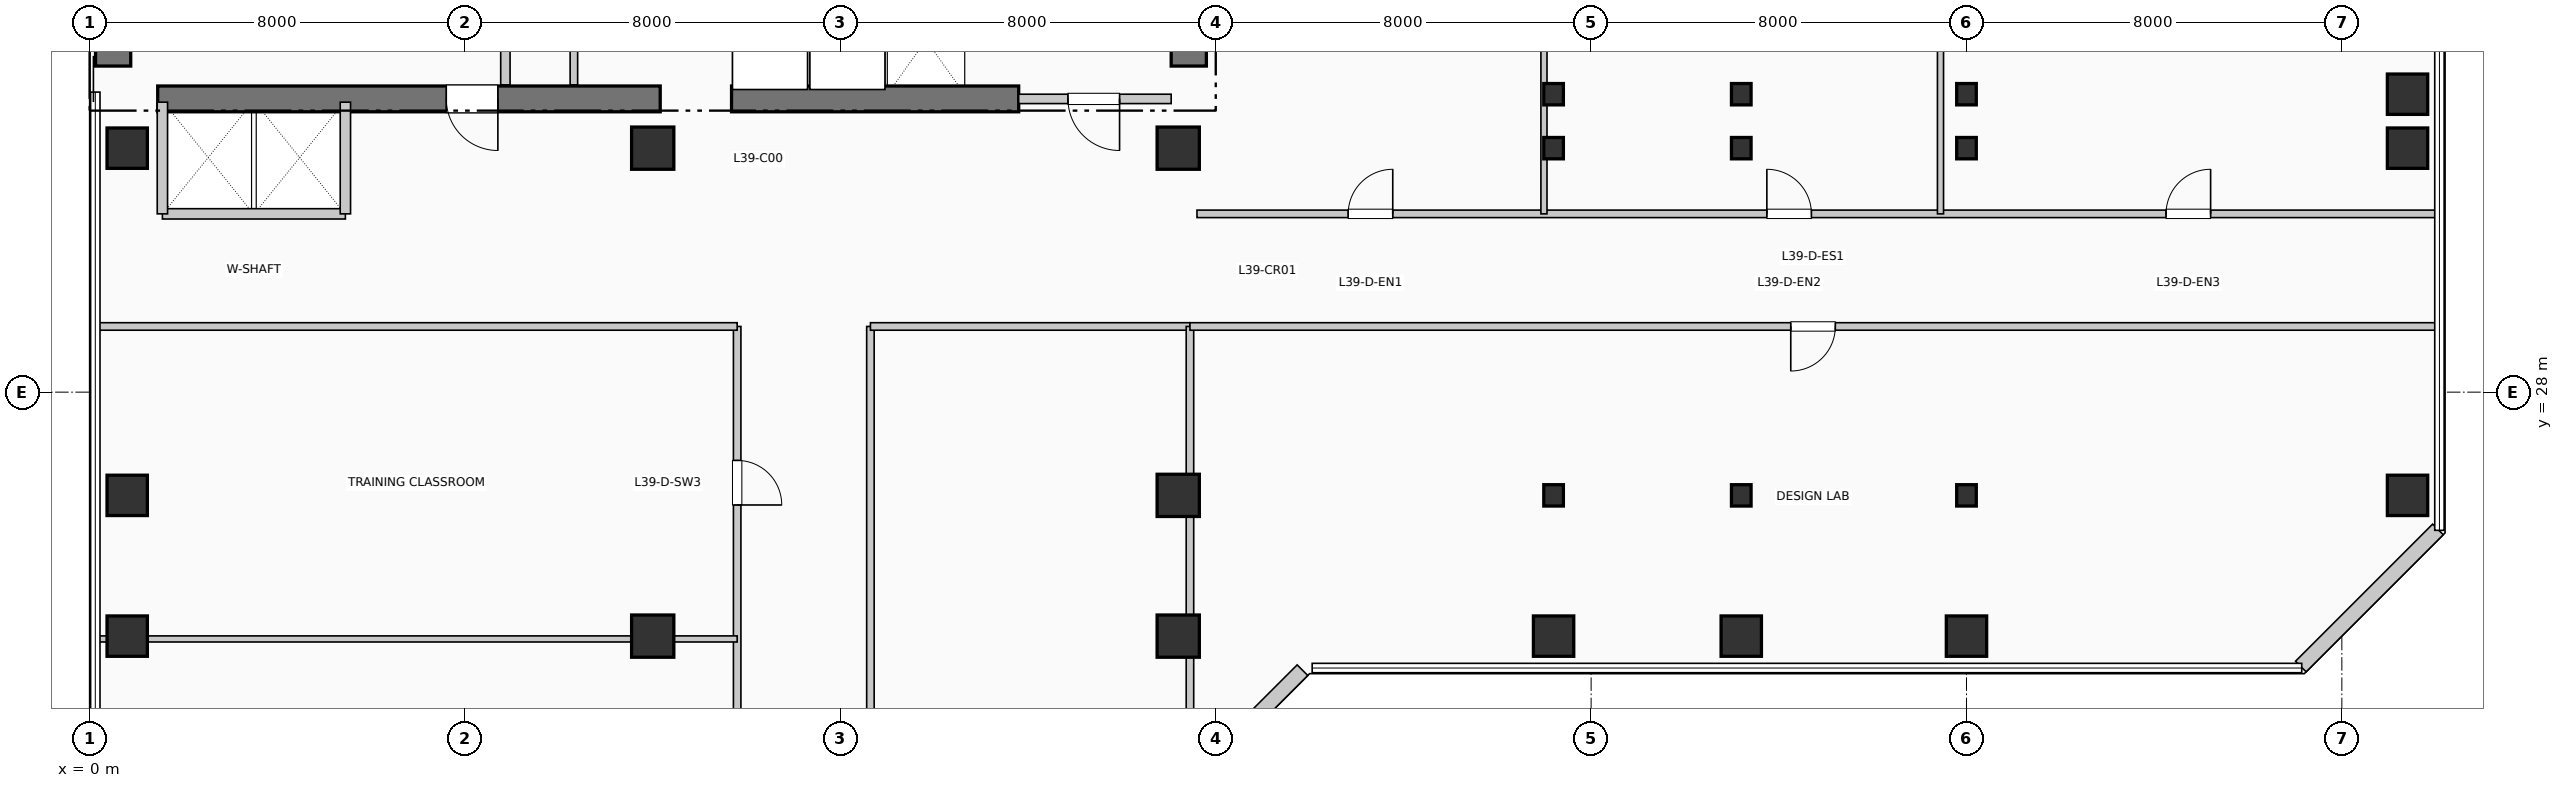
"""IFC4 building model, lengths in metres.
Left out: names, types, materials, properties, quantities, classifications, styles, units other than length and angle.
Written with IfcOpenShell. Run it as: python <this file> out.ifc"""

import sys

from ifc_helpers import new_model, si_unit, direction, frame, frame_2d, origin, origin_2d, place, context, subcontext, project, spatial, rectangle, i_section, extrude, element, fill, save


model = new_model("IFC4")
c1 = context("Model", 3, precision=1e-05, world=origin(), true_north=direction((0.0, 1.0)))
c2 = subcontext(c1, "Body", "Model", "MODEL_VIEW")
j1 = project(units=[si_unit("LENGTHUNIT", "METRE"), si_unit("PLANEANGLEUNIT", "RADIAN")], contexts=[c1])
p1 = place(None, origin())
s1 = spatial("IfcSite", under=j1, at=p1, CompositionType="ELEMENT")
p2 = place(p1, origin())
s2 = spatial("IfcBuilding", under=s1, at=p2, CompositionType="ELEMENT")
p3 = place(p2, frame((0.0, 0.0, 162.69)))
s3 = spatial("IfcBuildingStorey", under=s2, at=p3, CompositionType="ELEMENT", Elevation=162.69)
p4 = place(p3, frame((0.5, 34.95, 0.0), z_axis=(0.0, 0.0, 1.0), x_axis=(0.0, 1.0, 0.0)))
e1 = element("IfcWall", 1, at=p4, inside=s3, PredefinedType="SHEAR", context=c2, shape_type="SweptSolid", body=[
    extrude(rectangle(XDim=7.9, YDim=0.75, at=frame_2d((3.95, 0.0))), origin(), (0.0, 0.0, 1.0), 3.96),
])
p5 = place(p3, frame((23.425, 34.95, 0.0), z_axis=(0.0, 0.0, 1.0), x_axis=(0.0, 1.0, 0.0)))
e2 = element("IfcWall", 2, at=p5, inside=s3, PredefinedType="SHEAR", context=c2, shape_type="SweptSolid", body=[
    extrude(rectangle(XDim=10.64, YDim=0.75, at=frame_2d((5.32, 0.0))), origin(), (0.0, 0.0, 1.0), 3.96),
])
p6 = place(p3, frame((1.45, 34.25, 0.0), z_axis=(0.0, 0.0, 1.0), x_axis=(1.0, 0.0, 0.0)))
e3 = element("IfcWall", 3, at=p6, inside=s3, PredefinedType="SHEAR", context=c2, shape_type="SweptSolid", body=[
    extrude(rectangle(XDim=10.71, YDim=0.55, at=frame_2d((5.355, 0.0))), origin(), (0.0, 0.0, 1.0), 3.96),
])
p7 = place(p6, frame((7.25, 0.0, 0.0), z_axis=(0.0, 0.0, 1.0), x_axis=(-1.0, 0.0, 0.0)))
e4 = element("IfcOpeningElement", 4, at=p7, cuts=e3, PredefinedType="OPENING", context=c2, shape_type="SweptSolid", body=[
    extrude(rectangle(XDim=1.1, YDim=2.15, at=frame_2d((0.55, 1.075))), frame((0.0, 0.285, 0.0), z_axis=(0.0, -1.0, 0.0), x_axis=(1.0, 0.0, 0.0)), (0.0, 0.0, 1.0), 0.57),
])
p8 = place(p3, frame((13.68, 34.25, 0.0), z_axis=(0.0, 0.0, 1.0), x_axis=(1.0, 0.0, 0.0)))
e5 = element("IfcWall", 5, at=p8, inside=s3, PredefinedType="SHEAR", context=c2, shape_type="SweptSolid", body=[
    extrude(rectangle(XDim=6.12, YDim=0.55, at=frame_2d((3.06, 0.0))), origin(), (0.0, 0.0, 1.0), 3.96),
])
for number, where, z_axis, x_axis in (
    (6, (0.8, 22.8, 0.0), (0.0, 0.0, 1.0), (1.0, 0.0, 0.0)),
    (7, (0.8, 25.8, 0.0), (0.0, 0.0, 1.0), (1.0, 0.0, 0.0)),
    (8, (0.8, 33.2, 0.0), (0.0, 0.0, 1.0), (1.0, 0.0, 0.0)),
):
    element("IfcColumn", number, at=place(p3, frame(where, z_axis=z_axis, x_axis=x_axis)), inside=s3, PredefinedType="COLUMN", context=c2, shape_type="SweptSolid", body=[
        extrude(rectangle(XDim=0.86, YDim=0.86, at=origin_2d()), origin(), (0.0, 0.0, 1.0), 3.96),
    ])
for number, where, z_axis, x_axis in (
    (9, (12.0, 22.8, 0.0), (0.0, 0.0, 1.0), (1.0, 0.0, 0.0)),
    (10, (12.0, 33.2, 0.0), (0.0, 0.0, 1.0), (1.0, 0.0, 0.0)),
    (11, (23.2, 22.8, 0.0), (0.0, 0.0, 1.0), (1.0, 0.0, 0.0)),
    (12, (23.2, 25.8, 0.0), (0.0, 0.0, 1.0), (1.0, 0.0, 0.0)),
    (13, (23.2, 33.2, 0.0), (0.0, 0.0, 1.0), (1.0, 0.0, 0.0)),
):
    element("IfcColumn", number, at=place(p3, frame(where, z_axis=z_axis, x_axis=x_axis)), inside=s3, PredefinedType="COLUMN", context=c2, shape_type="SweptSolid", body=[
        extrude(rectangle(XDim=0.9, YDim=0.9, at=origin_2d()), origin(), (0.0, 0.0, 1.0), 3.96),
    ])
p9 = place(p3, frame((31.2, 22.8, 0.0), z_axis=(0.0, 0.0, 1.0), x_axis=(1.0, 0.0, 0.0)))
e14 = element("IfcColumn", 14, at=p9, inside=s3, PredefinedType="COLUMN", context=c2, shape_type="SweptSolid", body=[
    extrude(rectangle(XDim=0.86, YDim=0.86, at=origin_2d()), origin(), (0.0, 0.0, 1.0), 3.96),
])
for number, where, z_axis, x_axis in (
    (15, (31.2, 25.8, 0.0), (0.0, 0.0, 1.0), (1.0, 0.0, 0.0)),
    (16, (31.2, 33.2, 0.0), (0.0, 0.0, 1.0), (1.0, 0.0, 0.0)),
    (17, (31.2, 34.35, 0.0), (0.0, 0.0, 1.0), (1.0, 0.0, 0.0)),
):
    element("IfcColumn", number, at=place(p3, frame(where, z_axis=z_axis, x_axis=x_axis)), inside=s3, PredefinedType="COLUMN", context=c2, shape_type="SweptSolid", body=[
        extrude(i_section(OverallWidth=0.418, OverallDepth=0.455, WebThickness=0.032, FlangeThickness=0.051, at=origin_2d()), origin(), (0.0, 0.0, 1.0), 3.96),
    ])
p10 = place(p3, frame((35.2, 22.8, 0.0), z_axis=(0.0, 0.0, 1.0), x_axis=(1.0, 0.0, 0.0)))
e18 = element("IfcColumn", 18, at=p10, inside=s3, PredefinedType="COLUMN", context=c2, shape_type="SweptSolid", body=[
    extrude(rectangle(XDim=0.86, YDim=0.86, at=origin_2d()), origin(), (0.0, 0.0, 1.0), 3.96),
])
for number, where, z_axis, x_axis in (
    (19, (35.2, 25.8, 0.0), (0.0, 0.0, 1.0), (1.0, 0.0, 0.0)),
    (20, (35.2, 33.2, 0.0), (0.0, 0.0, 1.0), (1.0, 0.0, 0.0)),
    (21, (35.2, 34.35, 0.0), (0.0, 0.0, 1.0), (1.0, 0.0, 0.0)),
):
    element("IfcColumn", number, at=place(p3, frame(where, z_axis=z_axis, x_axis=x_axis)), inside=s3, PredefinedType="COLUMN", context=c2, shape_type="SweptSolid", body=[
        extrude(i_section(OverallWidth=0.418, OverallDepth=0.455, WebThickness=0.032, FlangeThickness=0.051, at=origin_2d()), origin(), (0.0, 0.0, 1.0), 3.96),
    ])
p11 = place(p3, frame((40.0, 22.8, 0.0), z_axis=(0.0, 0.0, 1.0), x_axis=(1.0, 0.0, 0.0)))
e22 = element("IfcColumn", 22, at=p11, inside=s3, PredefinedType="COLUMN", context=c2, shape_type="SweptSolid", body=[
    extrude(rectangle(XDim=0.86, YDim=0.86, at=origin_2d()), origin(), (0.0, 0.0, 1.0), 3.96),
])
for number, where, z_axis, x_axis in (
    (23, (40.0, 25.8, 0.0), (0.0, 0.0, 1.0), (1.0, 0.0, 0.0)),
    (24, (40.0, 33.2, 0.0), (0.0, 0.0, 1.0), (1.0, 0.0, 0.0)),
    (25, (40.0, 34.35, 0.0), (0.0, 0.0, 1.0), (1.0, 0.0, 0.0)),
):
    element("IfcColumn", number, at=place(p3, frame(where, z_axis=z_axis, x_axis=x_axis)), inside=s3, PredefinedType="COLUMN", context=c2, shape_type="SweptSolid", body=[
        extrude(i_section(OverallWidth=0.418, OverallDepth=0.455, WebThickness=0.032, FlangeThickness=0.051, at=origin_2d()), origin(), (0.0, 0.0, 1.0), 3.96),
    ])
for number, where, z_axis, x_axis in (
    (26, (49.4, 25.8, 0.0), (0.0, 0.0, 1.0), (1.0, 0.0, 0.0)),
    (27, (49.4, 33.2, 0.0), (0.0, 0.0, 1.0), (1.0, 0.0, 0.0)),
    (28, (49.4, 34.35, 0.0), (0.0, 0.0, 1.0), (1.0, 0.0, 0.0)),
):
    element("IfcColumn", number, at=place(p3, frame(where, z_axis=z_axis, x_axis=x_axis)), inside=s3, PredefinedType="COLUMN", context=c2, shape_type="SweptSolid", body=[
        extrude(rectangle(XDim=0.86, YDim=0.86, at=origin_2d()), origin(), (0.0, 0.0, 1.0), 3.96),
    ])
p12 = place(p3, frame((23.926, 20.152, 0.0), z_axis=(0.0, 0.0, 1.0), x_axis=(0.707106781187, 0.707106781187, 0.0)))
e29 = element("IfcWall", 29, at=p12, inside=s3, PredefinedType="SOLIDWALL", context=c2, shape_type="SweptSolid", body=[
    extrude(rectangle(XDim=2.718, YDim=0.32, at=frame_2d((1.359, 0.0))), origin(), (0.0, 0.0, 1.0), 3.71),
])
p13 = place(p3, frame((47.126, 22.152, 0.0), z_axis=(0.0, 0.0, 1.0), x_axis=(0.707136318428, 0.707077242712, 0.0)))
e30 = element("IfcWall", 30, at=p13, inside=s3, PredefinedType="SOLIDWALL", context=c2, shape_type="SweptSolid", body=[
    extrude(rectangle(XDim=4.133, YDim=0.32, at=frame_2d((2.066, 0.0))), origin(), (0.0, 0.0, 1.0), 3.71),
])
p14 = place(p3, frame((8.86, 34.55, 0.0), z_axis=(0.0, 0.0, 1.0), x_axis=(0.0, 1.0, 0.0)))
e31 = element("IfcWall", 31, at=p14, inside=s3, PredefinedType="PARTITIONING", context=c2, shape_type="SweptSolid", body=[
    extrude(rectangle(XDim=2.5, YDim=0.2, at=frame_2d((1.25, 0.0))), origin(), (0.0, 0.0, 1.0), 3.71),
])
p15 = place(p3, frame((19.8, 34.25, 0.0), z_axis=(0.0, 0.0, 1.0), x_axis=(1.0, 0.0, 0.0)))
e32 = element("IfcWall", 32, at=p15, inside=s3, PredefinedType="PARTITIONING", context=c2, shape_type="SweptSolid", body=[
    extrude(rectangle(XDim=3.25, YDim=0.2, at=frame_2d((1.625, 0.0))), origin(), (0.0, 0.0, 1.0), 3.71),
])
p16 = place(p15, frame((2.15, 0.0, 0.0), z_axis=(0.0, 0.0, 1.0), x_axis=(-1.0, 0.0, 0.0)))
e33 = element("IfcOpeningElement", 33, at=p16, cuts=e32, PredefinedType="OPENING", context=c2, shape_type="SweptSolid", body=[
    extrude(rectangle(XDim=1.1, YDim=2.15, at=frame_2d((0.55, 1.075))), frame((0.0, 0.11, 0.0), z_axis=(0.0, -1.0, 0.0), x_axis=(1.0, 0.0, 0.0)), (0.0, 0.0, 1.0), 0.22),
])
p17 = place(p3, frame((1.55, 31.8, 0.0), z_axis=(0.0, 0.0, 1.0), x_axis=(1.0, 0.0, 0.0)))
e34 = element("IfcWall", 34, at=p17, inside=s3, PredefinedType="PARTITIONING", context=c2, shape_type="SweptSolid", body=[
    extrude(rectangle(XDim=3.9, YDim=0.22, at=frame_2d((1.95, 0.0))), origin(), (0.0, 0.0, 1.0), 3.71),
])
for number, where, z_axis, x_axis in (
    (35, (1.55, 31.8, 0.0), (0.0, 0.0, 1.0), (0.0, 1.0, 0.0)),
    (36, (5.45, 31.8, 0.0), (0.0, 0.0, 1.0), (0.0, 1.0, 0.0)),
):
    element("IfcWall", number, at=place(p3, frame(where, z_axis=z_axis, x_axis=x_axis)), inside=s3, PredefinedType="PARTITIONING", context=c2, shape_type="SweptSolid", body=[
        extrude(rectangle(XDim=2.38, YDim=0.22, at=frame_2d((1.19, 0.0))), origin(), (0.0, 0.0, 1.0), 3.71),
    ])
p18 = place(p3, frame((10.32, 34.55, 0.0), z_axis=(0.0, 0.0, 1.0), x_axis=(0.0, 1.0, 0.0)))
e37 = element("IfcWall", 37, at=p18, inside=s3, PredefinedType="PARTITIONING", context=c2, shape_type="SweptSolid", body=[
    extrude(rectangle(XDim=2.15, YDim=0.16, at=frame_2d((1.075, 0.0))), origin(), (0.0, 0.0, 1.0), 3.71),
])
p19 = place(p3, frame((13.8, 7.2, 0.0), z_axis=(0.0, 0.0, 1.0), x_axis=(0.0, 1.0, 0.0)))
e38 = element("IfcWall", 38, at=p19, inside=s3, PredefinedType="PARTITIONING", context=c2, shape_type="SweptSolid", body=[
    extrude(rectangle(XDim=22.2, YDim=0.16, at=frame_2d((11.1, 0.0))), origin(), (0.0, 0.0, 1.0), 3.71),
])
p20 = place(p19, frame((4.36, 0.0, 0.0), z_axis=(0.0, 0.0, 1.0), x_axis=(-1.0, 0.0, 0.0)))
e39 = element("IfcOpeningElement", 39, at=p20, cuts=e38, PredefinedType="OPENING", context=c2, shape_type="SweptSolid", body=[
    extrude(rectangle(XDim=0.95, YDim=2.15, at=frame_2d((0.475, 1.075))), frame((0.0, 0.09, 0.0), z_axis=(0.0, -1.0, 0.0), x_axis=(1.0, 0.0, 0.0)), (0.0, 0.0, 1.0), 0.18),
])
p21 = place(p19, frame((12.13, 0.0, 0.0), z_axis=(0.0, 0.0, 1.0), x_axis=(-1.0, 0.0, 0.0)))
e40 = element("IfcOpeningElement", 40, at=p21, cuts=e38, PredefinedType="OPENING", context=c2, shape_type="SweptSolid", body=[
    extrude(rectangle(XDim=0.95, YDim=2.15, at=frame_2d((0.475, 1.075))), frame((0.0, 0.09, 0.0), z_axis=(0.0, -1.0, 0.0), x_axis=(1.0, 0.0, 0.0)), (0.0, 0.0, 1.0), 0.18),
])
p22 = place(p19, frame((19.345, 0.0, 0.0), z_axis=(0.0, 0.0, 1.0), x_axis=(-1.0, 0.0, 0.0)))
e41 = element("IfcOpeningElement", 41, at=p22, cuts=e38, PredefinedType="OPENING", context=c2, shape_type="SweptSolid", body=[
    extrude(rectangle(XDim=0.95, YDim=2.15, at=frame_2d((0.475, 1.075))), frame((0.0, 0.09, 0.0), z_axis=(0.0, -1.0, 0.0), x_axis=(1.0, 0.0, 0.0)), (0.0, 0.0, 1.0), 0.18),
])
p23 = place(p3, frame((16.64, 7.2, 0.0), z_axis=(0.0, 0.0, 1.0), x_axis=(0.0, 1.0, 0.0)))
e42 = element("IfcWall", 42, at=p23, inside=s3, PredefinedType="PARTITIONING", context=c2, shape_type="SweptSolid", body=[
    extrude(rectangle(XDim=22.2, YDim=0.16, at=frame_2d((11.1, 0.0))), origin(), (0.0, 0.0, 1.0), 3.71),
])
p24 = place(p23, frame((10.625, 0.0, 0.0)))
e43 = element("IfcOpeningElement", 43, at=p24, cuts=e42, PredefinedType="OPENING", context=c2, shape_type="SweptSolid", body=[
    extrude(rectangle(XDim=0.95, YDim=2.15, at=frame_2d((0.475, 1.075))), frame((0.0, 0.09, 0.0), z_axis=(0.0, -1.0, 0.0), x_axis=(1.0, 0.0, 0.0)), (0.0, 0.0, 1.0), 0.18),
])
p25 = place(p3, frame((0.19, 29.4, 0.0), z_axis=(0.0, 0.0, 1.0), x_axis=(1.0, 0.0, 0.0)))
e44 = element("IfcWall", 44, at=p25, inside=s3, PredefinedType="PARTITIONING", context=c2, shape_type="SweptSolid", body=[
    extrude(rectangle(XDim=13.61, YDim=0.16, at=frame_2d((6.805, 0.0))), origin(), (0.0, 0.0, 1.0), 3.365),
])
p26 = place(p3, frame((16.64, 29.4, 0.0), z_axis=(0.0, 0.0, 1.0), x_axis=(1.0, 0.0, 0.0)))
e45 = element("IfcWall", 45, at=p26, inside=s3, PredefinedType="PARTITIONING", context=c2, shape_type="SweptSolid", body=[
    extrude(rectangle(XDim=6.81, YDim=0.16, at=frame_2d((3.405, 0.0))), origin(), (0.0, 0.0, 1.0), 3.71),
])
p27 = place(p3, frame((23.45, 1.04, 0.0), z_axis=(0.0, 0.0, 1.0), x_axis=(0.0, 1.0, 0.0)))
e46 = element("IfcWall", 46, at=p27, inside=s3, PredefinedType="PARTITIONING", context=c2, shape_type="SweptSolid", body=[
    extrude(rectangle(XDim=28.36, YDim=0.16, at=frame_2d((14.18, 0.0))), origin(), (0.0, 0.0, 1.0), 3.045),
])
p28 = place(p3, frame((0.19, 22.74, 0.0), z_axis=(0.0, 0.0, 1.0), x_axis=(1.0, 0.0, 0.0)))
e47 = element("IfcWall", 47, at=p28, inside=s3, PredefinedType="PARTITIONING", context=c2, shape_type="SweptSolid", body=[
    extrude(rectangle(XDim=13.61, YDim=0.13, at=frame_2d((6.805, 0.0))), origin(), (0.0, 0.0, 1.0), 3.045),
])
p29 = place(p3, frame((23.45, 29.4, 0.0), z_axis=(0.0, 0.0, 1.0), x_axis=(1.0, 0.0, 0.0)))
e48 = element("IfcWall", 48, at=p29, inside=s3, PredefinedType="PARTITIONING", context=c2, shape_type="SweptSolid", body=[
    extrude(rectangle(XDim=26.56, YDim=0.16, at=frame_2d((13.28, 0.0))), origin(), (0.0, 0.0, 1.0), 3.365),
])
p30 = place(p29, frame((13.755, 0.0, 0.0), z_axis=(0.0, 0.0, 1.0), x_axis=(-1.0, 0.0, 0.0)))
e49 = element("IfcOpeningElement", 49, at=p30, cuts=e48, PredefinedType="OPENING", context=c2, shape_type="SweptSolid", body=[
    extrude(rectangle(XDim=0.95, YDim=2.15, at=frame_2d((0.475, 1.075))), frame((0.0, 0.09, 0.0), z_axis=(0.0, -1.0, 0.0), x_axis=(1.0, 0.0, 0.0)), (0.0, 0.0, 1.0), 0.18),
])
p31 = place(p3, frame((23.6, 31.8, 0.0), z_axis=(0.0, 0.0, 1.0), x_axis=(1.0, 0.0, 0.0)))
e50 = element("IfcWall", 50, at=p31, inside=s3, PredefinedType="PARTITIONING", context=c2, shape_type="SweptSolid", body=[
    extrude(rectangle(XDim=26.41, YDim=0.16, at=frame_2d((13.205, 0.0))), origin(), (0.0, 0.0, 1.0), 3.71),
])
p32 = place(p31, frame((3.222, 0.0, 0.0)))
e51 = element("IfcOpeningElement", 51, at=p32, cuts=e50, PredefinedType="OPENING", context=c2, shape_type="SweptSolid", body=[
    extrude(rectangle(XDim=0.95, YDim=2.15, at=frame_2d((0.475, 1.075))), frame((0.0, 0.09, 0.0), z_axis=(0.0, -1.0, 0.0), x_axis=(1.0, 0.0, 0.0)), (0.0, 0.0, 1.0), 0.18),
])
p33 = place(p31, frame((12.146, 0.0, 0.0)))
e52 = element("IfcOpeningElement", 52, at=p33, cuts=e50, PredefinedType="OPENING", context=c2, shape_type="SweptSolid", body=[
    extrude(rectangle(XDim=0.95, YDim=2.15, at=frame_2d((0.475, 1.075))), frame((0.0, 0.09, 0.0), z_axis=(0.0, -1.0, 0.0), x_axis=(1.0, 0.0, 0.0)), (0.0, 0.0, 1.0), 0.18),
])
p34 = place(p31, frame((20.653, 0.0, 0.0)))
e53 = element("IfcOpeningElement", 53, at=p34, cuts=e50, PredefinedType="OPENING", context=c2, shape_type="SweptSolid", body=[
    extrude(rectangle(XDim=0.95, YDim=2.15, at=frame_2d((0.475, 1.075))), frame((0.0, 0.09, 0.0), z_axis=(0.0, -1.0, 0.0), x_axis=(1.0, 0.0, 0.0)), (0.0, 0.0, 1.0), 0.18),
])
p35 = place(p3, frame((30.995, 31.8, 0.0), z_axis=(0.0, 0.0, 1.0), x_axis=(0.0, 1.0, 0.0)))
e54 = element("IfcWall", 54, at=p35, inside=s3, PredefinedType="PARTITIONING", context=c2, shape_type="SweptSolid", body=[
    extrude(rectangle(XDim=14.01, YDim=0.13, at=frame_2d((7.005, 0.0))), origin(), (0.0, 0.0, 1.0), 3.045),
])
p36 = place(p3, frame((39.446, 31.8, 0.0), z_axis=(0.0, 0.0, 1.0), x_axis=(0.0, 1.0, 0.0)))
e55 = element("IfcWall", 55, at=p36, inside=s3, PredefinedType="PARTITIONING", context=c2, shape_type="SweptSolid", body=[
    extrude(rectangle(XDim=14.01, YDim=0.13, at=frame_2d((7.005, 0.0))), origin(), (0.0, 0.0, 1.0), 3.71),
])
p37 = place(p7, origin())
e56 = element("IfcDoor", 56, at=p37, inside=s3, OperationType="SINGLE_SWING_RIGHT", PredefinedType="DOOR", context=c2, shape_type="SweptSolid", body=[
    extrude(rectangle(XDim=1.1, YDim=2.15, at=frame_2d((0.55, 1.075))), frame((0.0, 0.025, 0.0), z_axis=(0.0, -1.0, 0.0), x_axis=(1.0, 0.0, 0.0)), (0.0, 0.0, 1.0), 0.05),
])
fill(e4, e56)
p38 = place(p16, origin())
e57 = element("IfcDoor", 57, at=p38, inside=s3, OperationType="SINGLE_SWING_RIGHT", PredefinedType="DOOR", context=c2, shape_type="SweptSolid", body=[
    extrude(rectangle(XDim=1.1, YDim=2.15, at=frame_2d((0.55, 1.075))), frame((0.0, 0.025, 0.0), z_axis=(0.0, -1.0, 0.0), x_axis=(1.0, 0.0, 0.0)), (0.0, 0.0, 1.0), 0.05),
])
fill(e33, e57)
p39 = place(p22, origin())
e58 = element("IfcDoor", 58, at=p39, inside=s3, OperationType="SINGLE_SWING_LEFT", PredefinedType="DOOR", context=c2, shape_type="SweptSolid", body=[
    extrude(rectangle(XDim=0.95, YDim=2.15, at=frame_2d((0.475, 1.075))), frame((0.0, 0.025, 0.0), z_axis=(0.0, -1.0, 0.0), x_axis=(1.0, 0.0, 0.0)), (0.0, 0.0, 1.0), 0.05),
])
fill(e41, e58)
p40 = place(p30, origin())
e59 = element("IfcDoor", 59, at=p40, inside=s3, OperationType="SINGLE_SWING_LEFT", PredefinedType="DOOR", context=c2, shape_type="SweptSolid", body=[
    extrude(rectangle(XDim=0.95, YDim=2.15, at=frame_2d((0.475, 1.075))), frame((0.0, 0.025, 0.0), z_axis=(0.0, -1.0, 0.0), x_axis=(1.0, 0.0, 0.0)), (0.0, 0.0, 1.0), 0.05),
])
fill(e49, e59)
p41 = place(p32, origin())
e60 = element("IfcDoor", 60, at=p41, inside=s3, OperationType="SINGLE_SWING_RIGHT", PredefinedType="DOOR", context=c2, shape_type="SweptSolid", body=[
    extrude(rectangle(XDim=0.95, YDim=2.15, at=frame_2d((0.475, 1.075))), frame((0.0, 0.025, 0.0), z_axis=(0.0, -1.0, 0.0), x_axis=(1.0, 0.0, 0.0)), (0.0, 0.0, 1.0), 0.05),
])
fill(e51, e60)
p42 = place(p33, origin())
e61 = element("IfcDoor", 61, at=p42, inside=s3, OperationType="SINGLE_SWING_LEFT", PredefinedType="DOOR", context=c2, shape_type="SweptSolid", body=[
    extrude(rectangle(XDim=0.95, YDim=2.15, at=frame_2d((0.475, 1.075))), frame((0.0, 0.025, 0.0), z_axis=(0.0, -1.0, 0.0), x_axis=(1.0, 0.0, 0.0)), (0.0, 0.0, 1.0), 0.05),
])
fill(e52, e61)
p43 = place(p34, origin())
e62 = element("IfcDoor", 62, at=p43, inside=s3, OperationType="SINGLE_SWING_RIGHT", PredefinedType="DOOR", context=c2, shape_type="SweptSolid", body=[
    extrude(rectangle(XDim=0.95, YDim=2.15, at=frame_2d((0.475, 1.075))), frame((0.0, 0.025, 0.0), z_axis=(0.0, -1.0, 0.0), x_axis=(1.0, 0.0, 0.0)), (0.0, 0.0, 1.0), 0.05),
])
fill(e53, e62)
save(model, sys.argv[1])
